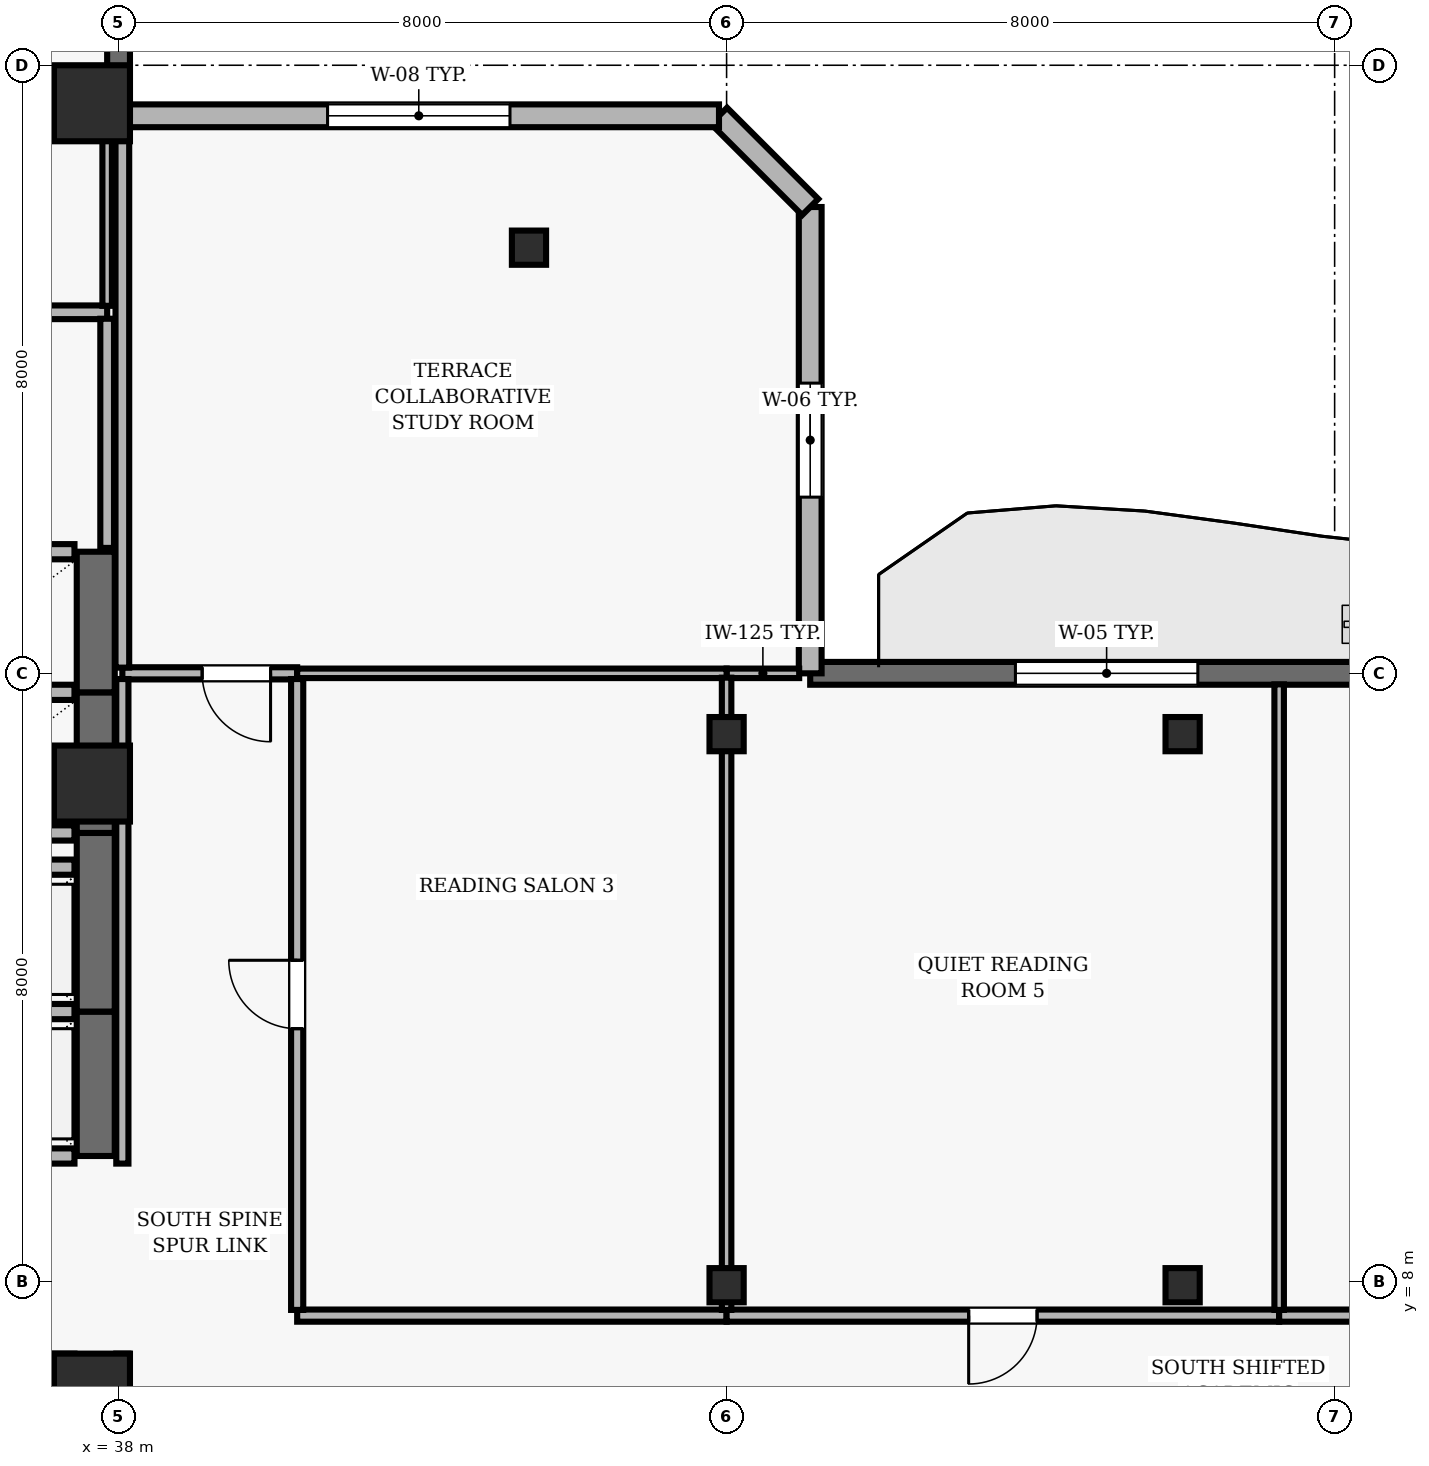
"""IFC4 building model, lengths in metres.
Left out: names, types, materials, properties, quantities, classifications, styles, units other than length and angle.
Written with IfcOpenShell. Run it as: python <this file> out.ifc"""

import sys

from ifc_helpers import new_model, si_unit, direction, frame, frame_2d, origin, origin_2d, place, context, subcontext, project, spatial, rectangle, hollow_rectangle, extrude, element, fill, save


model = new_model("IFC4")
c1 = context("Model", 3, precision=1e-05, world=origin(), true_north=direction((0.0, 1.0)))
c2 = subcontext(c1, "Body", "Model", "MODEL_VIEW")
j1 = project(units=[si_unit("LENGTHUNIT", "METRE"), si_unit("PLANEANGLEUNIT", "RADIAN")], contexts=[c1])
p1 = place(None, origin())
s1 = spatial("IfcSite", under=j1, at=p1, CompositionType="ELEMENT")
p2 = place(p1, origin())
s2 = spatial("IfcBuilding", under=s1, at=p2, CompositionType="ELEMENT")
p3 = place(p2, frame((0.0, 0.0, 199.2)))
s3 = spatial("IfcBuildingStorey", under=s2, at=p3, CompositionType="ELEMENT", Elevation=199.2)
for number, where, z_axis, x_axis in (
    (1, (37.65, 6.55, 0.0), (0.0, 0.0, 1.0), (1.0, 0.0, 0.0)),
    (2, (37.65, 14.55, 0.0), (0.0, 0.0, 1.0), (1.0, 0.0, 0.0)),
    (3, (37.65, 23.5, 0.0), (0.0, 0.0, 1.0), (1.0, 0.0, 0.0)),
):
    element("IfcColumn", number, at=place(p3, frame(where, z_axis=z_axis, x_axis=x_axis)), inside=s3, PredefinedType="COLUMN", context=c2, shape_type="SweptSolid", body=[
        extrude(rectangle(XDim=1.0, YDim=1.0, at=origin_2d()), origin(), (0.0, 0.0, 1.0), 3.9),
    ])
for number, where, z_axis, x_axis in (
    (4, (46.0, 7.95, 0.0), (0.0, 0.0, 1.0), (1.0, 0.0, 0.0)),
    (5, (46.0, 15.2, 0.0), (0.0, 0.0, 1.0), (1.0, 0.0, 0.0)),
    (6, (52.0, 7.95, 0.0), (0.0, 0.0, 1.0), (1.0, 0.0, 0.0)),
    (7, (52.0, 15.2, 0.0), (0.0, 0.0, 1.0), (1.0, 0.0, 0.0)),
    (8, (43.4, 21.6, 0.0), (0.0, 0.0, 1.0), (1.0, 0.0, 0.0)),
):
    element("IfcColumn", number, at=place(p3, frame(where, z_axis=z_axis, x_axis=x_axis)), inside=s3, PredefinedType="COLUMN", context=c2, shape_type="SweptSolid", body=[
        extrude(hollow_rectangle(XDim=0.45, YDim=0.45, WallThickness=0.02, at=origin_2d()), origin(), (0.0, 0.0, 1.0), 3.9),
    ])
p4 = place(p3, frame((62.7, 16.0, 0.0), z_axis=(0.0, 0.0, 1.0), x_axis=(-1.0, 0.0, 0.0)))
e9 = element("IfcWall", 9, at=p4, inside=s3, PredefinedType="SOLIDWALL", context=c2, shape_type="SweptSolid", body=[
    extrude(rectangle(XDim=15.6, YDim=0.3, at=frame_2d((7.8, 0.0))), origin(), (0.0, 0.0, 1.0), 3.69),
])
p5 = place(p4, frame((7.2, 0.0, 0.0)))
e10 = element("IfcOpeningElement", 10, at=p5, cuts=e9, PredefinedType="OPENING", context=c2, shape_type="SweptSolid", body=[
    extrude(rectangle(XDim=1.0, YDim=2.2, at=frame_2d((0.5, 1.1))), frame((0.0, 0.16, 0.0), z_axis=(0.0, -1.0, 0.0), x_axis=(1.0, 0.0, 0.0)), (0.0, 0.0, 1.0), 0.32),
])
p6 = place(p4, frame((10.5, 0.0, 0.9)))
e11 = element("IfcOpeningElement", 11, at=p6, cuts=e9, PredefinedType="OPENING", context=c2, shape_type="SweptSolid", body=[
    extrude(rectangle(XDim=2.4, YDim=1.6, at=frame_2d((1.2, 0.8))), frame((0.0, 0.16, 0.0), z_axis=(0.0, -1.0, 0.0), x_axis=(1.0, 0.0, 0.0)), (0.0, 0.0, 1.0), 0.32),
])
p7 = place(p3, frame((47.1, 16.0, 0.0), z_axis=(0.0, 0.0, 1.0), x_axis=(0.0, 1.0, 0.0)))
e12 = element("IfcWall", 12, at=p7, inside=s3, PredefinedType="SOLIDWALL", context=c2, shape_type="SweptSolid", body=[
    extrude(rectangle(XDim=6.135, YDim=0.3, at=frame_2d((3.067, 0.0))), origin(), (0.0, 0.0, 1.0), 3.69),
])
p8 = place(p7, frame((2.318, 0.0, 0.9)))
e13 = element("IfcOpeningElement", 13, at=p8, cuts=e12, PredefinedType="OPENING", context=c2, shape_type="SweptSolid", body=[
    extrude(rectangle(XDim=1.5, YDim=1.8, at=frame_2d((0.75, 0.9))), frame((0.0, 0.16, 0.0), z_axis=(0.0, -1.0, 0.0), x_axis=(1.0, 0.0, 0.0)), (0.0, 0.0, 1.0), 0.32),
])
p9 = place(p3, frame((47.1, 22.135, 0.0), z_axis=(0.0, 0.0, 1.0), x_axis=(-0.707178703759, 0.707034851297, 0.0)))
e14 = element("IfcWall", 14, at=p9, inside=s3, PredefinedType="SOLIDWALL", context=c2, shape_type="SweptSolid", body=[
    extrude(rectangle(XDim=1.697, YDim=0.3, at=frame_2d((0.849, 0.0))), origin(), (0.0, 0.0, 1.0), 3.69),
])
p10 = place(p3, frame((45.9, 23.335, 0.0), z_axis=(0.0, 0.0, 1.0), x_axis=(-1.0, 0.0, 0.0)))
e15 = element("IfcWall", 15, at=p10, inside=s3, PredefinedType="SOLIDWALL", context=c2, shape_type="SweptSolid", body=[
    extrude(rectangle(XDim=7.9, YDim=0.3, at=frame_2d((3.95, 0.0))), origin(), (0.0, 0.0, 1.0), 3.69),
])
p11 = place(p10, frame((2.75, 0.0, 0.9)))
e16 = element("IfcOpeningElement", 16, at=p11, cuts=e15, PredefinedType="OPENING", context=c2, shape_type="SweptSolid", body=[
    extrude(rectangle(XDim=2.4, YDim=1.8, at=frame_2d((1.2, 0.9))), frame((0.0, 0.16, 0.0), z_axis=(0.0, -1.0, 0.0), x_axis=(1.0, 0.0, 0.0)), (0.0, 0.0, 1.0), 0.32),
])
p12 = place(p3, frame((38.0, 23.335, 0.0), z_axis=(0.0, 0.0, 1.0), x_axis=(0.0, 1.0, 0.0)))
e17 = element("IfcWall", 17, at=p12, inside=s3, PredefinedType="SOLIDWALL", context=c2, shape_type="SweptSolid", body=[
    extrude(rectangle(XDim=17.365, YDim=0.3, at=frame_2d((8.683, 0.0))), origin(), (0.0, 0.0, 1.0), 3.69),
])
p13 = place(p12, frame((8.282, 0.0, 0.0)))
e18 = element("IfcOpeningElement", 18, at=p13, cuts=e17, PredefinedType="OPENING", context=c2, shape_type="SweptSolid", body=[
    extrude(rectangle(XDim=1.0, YDim=2.2, at=frame_2d((0.5, 1.1))), frame((0.0, 0.16, 0.0), z_axis=(0.0, -1.0, 0.0), x_axis=(1.0, 0.0, 0.0)), (0.0, 0.0, 1.0), 0.32),
])
p14 = place(p12, frame((13.071, 0.0, 0.9)))
e19 = element("IfcOpeningElement", 19, at=p14, cuts=e17, PredefinedType="OPENING", context=c2, shape_type="SweptSolid", body=[
    extrude(rectangle(XDim=2.8, YDim=1.8, at=frame_2d((1.4, 0.9))), frame((0.0, 0.16, 0.0), z_axis=(0.0, -1.0, 0.0), x_axis=(1.0, 0.0, 0.0)), (0.0, 0.0, 1.0), 0.32),
])
p15 = place(p3, frame((37.7, 4.7, 0.0), z_axis=(0.0, 0.0, 1.0), x_axis=(0.0, 1.0, 0.0)))
e20 = element("IfcWall", 20, at=p15, inside=s3, PredefinedType="SHEAR", context=c2, shape_type="SweptSolid", body=[
    extrude(rectangle(XDim=2.25, YDim=0.5, at=frame_2d((1.125, 0.0))), origin(), (0.0, 0.0, 1.0), 3.69),
])
p16 = place(p3, frame((37.42, 6.95, 0.0), z_axis=(0.0, 0.0, 1.0), x_axis=(-1.0, 0.0, 0.0)))
e21 = element("IfcWall", 21, at=p16, inside=s3, PredefinedType="SOLIDWALL", context=c2, shape_type="SweptSolid", body=[
    extrude(rectangle(XDim=2.14, YDim=0.2, at=frame_2d((1.07, 0.0))), origin(), (0.0, 0.0, 1.0), 3.69),
])
p17 = place(p3, frame((37.7, 9.65, 0.0), z_axis=(0.0, 0.0, 1.0), x_axis=(0.0, 1.0, 0.0)))
e22 = element("IfcWall", 22, at=p17, inside=s3, PredefinedType="SHEAR", context=c2, shape_type="SweptSolid", body=[
    extrude(rectangle(XDim=1.9, YDim=0.5, at=frame_2d((0.95, 0.0))), origin(), (0.0, 0.0, 1.0), 3.69),
])
for number, where, z_axis, x_axis in (
    (23, (35.28, 9.65, 0.0), (0.0, 0.0, 1.0), (1.0, 0.0, 0.0)),
    (24, (37.42, 11.55, 0.0), (0.0, 0.0, 1.0), (-1.0, 0.0, 0.0)),
):
    element("IfcWall", number, at=place(p3, frame(where, z_axis=z_axis, x_axis=x_axis)), inside=s3, PredefinedType="SOLIDWALL", context=c2, shape_type="SweptSolid", body=[
        extrude(rectangle(XDim=2.14, YDim=0.2, at=frame_2d((1.07, 0.0))), origin(), (0.0, 0.0, 1.0), 3.69),
    ])
p18 = place(p3, frame((37.7, 11.55, 0.0), z_axis=(0.0, 0.0, 1.0), x_axis=(0.0, 1.0, 0.0)))
e25 = element("IfcWall", 25, at=p18, inside=s3, PredefinedType="SHEAR", context=c2, shape_type="SweptSolid", body=[
    extrude(rectangle(XDim=2.35, YDim=0.5, at=frame_2d((1.175, 0.0))), origin(), (0.0, 0.0, 1.0), 3.69),
])
p19 = place(p3, frame((37.42, 13.45, 0.0), z_axis=(0.0, 0.0, 1.0), x_axis=(-1.0, 0.0, 0.0)))
e26 = element("IfcWall", 26, at=p19, inside=s3, PredefinedType="SOLIDWALL", context=c2, shape_type="SweptSolid", body=[
    extrude(rectangle(XDim=2.14, YDim=0.2, at=frame_2d((1.07, 0.0))), origin(), (0.0, 0.0, 1.0), 3.69),
])
p20 = place(p3, frame((37.7, 13.9, 0.0), z_axis=(0.0, 0.0, 1.0), x_axis=(0.0, 1.0, 0.0)))
e27 = element("IfcWall", 27, at=p20, inside=s3, PredefinedType="SHEAR", context=c2, shape_type="SweptSolid", body=[
    extrude(rectangle(XDim=1.85, YDim=0.5, at=frame_2d((0.925, 0.0))), origin(), (0.0, 0.0, 1.0), 3.69),
])
for number, where, z_axis, x_axis in (
    (28, (35.28, 13.9, 0.0), (0.0, 0.0, 1.0), (1.0, 0.0, 0.0)),
    (29, (37.42, 15.75, 0.0), (0.0, 0.0, 1.0), (-1.0, 0.0, 0.0)),
):
    element("IfcWall", number, at=place(p3, frame(where, z_axis=z_axis, x_axis=x_axis)), inside=s3, PredefinedType="SOLIDWALL", context=c2, shape_type="SweptSolid", body=[
        extrude(rectangle(XDim=2.14, YDim=0.2, at=frame_2d((1.07, 0.0))), origin(), (0.0, 0.0, 1.0), 3.69),
    ])
p21 = place(p3, frame((37.7, 15.75, 0.0), z_axis=(0.0, 0.0, 1.0), x_axis=(0.0, 1.0, 0.0)))
e30 = element("IfcWall", 30, at=p21, inside=s3, PredefinedType="SHEAR", context=c2, shape_type="SweptSolid", body=[
    extrude(rectangle(XDim=1.85, YDim=0.5, at=frame_2d((0.925, 0.0))), origin(), (0.0, 0.0, 1.0), 3.69),
])
p22 = place(p3, frame((37.42, 17.6, 0.0), z_axis=(0.0, 0.0, 1.0), x_axis=(-1.0, 0.0, 0.0)))
e31 = element("IfcWall", 31, at=p22, inside=s3, PredefinedType="SOLIDWALL", context=c2, shape_type="SweptSolid", body=[
    extrude(rectangle(XDim=2.14, YDim=0.2, at=frame_2d((1.07, 0.0))), origin(), (0.0, 0.0, 1.0), 3.69),
])
p23 = place(p3, frame((37.85, 20.75, 0.0), z_axis=(0.0, 0.0, 1.0), x_axis=(-1.0, 0.0, 0.0)))
e32 = element("IfcWall", 32, at=p23, inside=s3, PredefinedType="PARTITIONING", context=c2, shape_type="SweptSolid", body=[
    extrude(rectangle(XDim=4.0, YDim=0.18, at=frame_2d((2.0, 0.0))), origin(), (0.0, 0.0, 1.0), 3.69),
])
p24 = place(p3, frame((37.85, 23.85, 0.0), z_axis=(0.0, 0.0, 1.0), x_axis=(-1.0, 0.0, 0.0)))
e33 = element("IfcWall", 33, at=p24, inside=s3, PredefinedType="PARTITIONING", context=c2, shape_type="SweptSolid", body=[
    extrude(rectangle(XDim=4.0, YDim=0.16, at=frame_2d((2.0, 0.0))), origin(), (0.0, 0.0, 1.0), 3.139),
])
p25 = place(p24, frame((2.25, 0.0, 0.0)))
e34 = element("IfcOpeningElement", 34, at=p25, cuts=e33, PredefinedType="OPENING", context=c2, shape_type="SweptSolid", body=[
    extrude(rectangle(XDim=0.9, YDim=2.1, at=frame_2d((0.45, 1.05))), frame((0.0, 0.09, 0.0), z_axis=(0.0, -1.0, 0.0), x_axis=(1.0, 0.0, 0.0)), (0.0, 0.0, 1.0), 0.18),
])
p26 = place(p3, frame((40.35, 16.0, 0.0), z_axis=(0.0, 0.0, 1.0), x_axis=(-1.0, 0.0, 0.0)))
e35 = element("IfcWall", 35, at=p26, inside=s3, PredefinedType="PARTITIONING", context=c2, shape_type="SweptSolid", body=[
    extrude(rectangle(XDim=2.3, YDim=0.16, at=frame_2d((1.15, 0.0))), origin(), (0.0, 0.0, 1.0), 3.69),
])
p27 = place(p26, frame((0.35, 0.0, 0.0)))
e36 = element("IfcOpeningElement", 36, at=p27, cuts=e35, PredefinedType="OPENING", context=c2, shape_type="SweptSolid", body=[
    extrude(rectangle(XDim=0.9, YDim=2.1, at=frame_2d((0.45, 1.05))), frame((0.0, 0.09, 0.0), z_axis=(0.0, -1.0, 0.0), x_axis=(1.0, 0.0, 0.0)), (0.0, 0.0, 1.0), 0.18),
])
p28 = place(p3, frame((46.0, 7.55, 0.0), z_axis=(0.0, 0.0, 1.0), x_axis=(-1.0, 0.0, 0.0)))
e37 = element("IfcWall", 37, at=p28, inside=s3, PredefinedType="PARTITIONING", context=c2, shape_type="SweptSolid", body=[
    extrude(rectangle(XDim=5.65, YDim=0.16, at=frame_2d((2.825, 0.0))), origin(), (0.0, 0.0, 1.0), 3.139),
])
p29 = place(p3, frame((46.0, 16.0, 0.0), z_axis=(0.0, 0.0, 1.0), x_axis=(1.0, 0.0, 0.0)))
e38 = element("IfcWall", 38, at=p29, inside=s3, PredefinedType="PARTITIONING", context=c2, shape_type="SweptSolid", body=[
    extrude(rectangle(XDim=0.955, YDim=0.125, at=frame_2d((0.478, 0.0))), origin(), (0.0, 0.0, 1.0), 3.39),
])
p30 = place(p3, frame((46.0, 16.0, 0.0), z_axis=(0.0, 0.0, 1.0), x_axis=(-1.0, 0.0, 0.0)))
e39 = element("IfcWall", 39, at=p30, inside=s3, PredefinedType="PARTITIONING", context=c2, shape_type="SweptSolid", body=[
    extrude(rectangle(XDim=5.65, YDim=0.125, at=frame_2d((2.825, 0.0))), origin(), (0.0, 0.0, 1.0), 3.69),
])
p31 = place(p3, frame((53.27, 7.55, 0.0), z_axis=(0.0, 0.0, 1.0), x_axis=(-1.0, 0.0, 0.0)))
e40 = element("IfcWall", 40, at=p31, inside=s3, PredefinedType="PARTITIONING", context=c2, shape_type="SweptSolid", body=[
    extrude(rectangle(XDim=7.27, YDim=0.16, at=frame_2d((3.635, 0.0))), origin(), (0.0, 0.0, 1.0), 3.139),
])
p32 = place(p31, frame((3.185, 0.0, 0.0)))
e41 = element("IfcOpeningElement", 41, at=p32, cuts=e40, PredefinedType="OPENING", context=c2, shape_type="SweptSolid", body=[
    extrude(rectangle(XDim=0.9, YDim=2.1, at=frame_2d((0.45, 1.05))), frame((0.0, 0.09, 0.0), z_axis=(0.0, -1.0, 0.0), x_axis=(1.0, 0.0, 0.0)), (0.0, 0.0, 1.0), 0.18),
])
p33 = place(p3, frame((59.48, 7.55, 0.0), z_axis=(0.0, 0.0, 1.0), x_axis=(-1.0, 0.0, 0.0)))
e42 = element("IfcWall", 42, at=p33, inside=s3, PredefinedType="PARTITIONING", context=c2, shape_type="SweptSolid", body=[
    extrude(rectangle(XDim=6.21, YDim=0.16, at=frame_2d((3.105, 0.0))), origin(), (0.0, 0.0, 1.0), 3.139),
])
p34 = place(p33, frame((3.355, 0.0, 0.0)))
e43 = element("IfcOpeningElement", 43, at=p34, cuts=e42, PredefinedType="OPENING", context=c2, shape_type="SweptSolid", body=[
    extrude(rectangle(XDim=0.9, YDim=2.1, at=frame_2d((0.45, 1.05))), frame((0.0, 0.09, 0.0), z_axis=(0.0, -1.0, 0.0), x_axis=(1.0, 0.0, 0.0)), (0.0, 0.0, 1.0), 0.18),
])
p35 = place(p3, frame((37.85, 17.65, 0.0), z_axis=(0.0, 0.0, 1.0), x_axis=(0.0, 1.0, 0.0)))
e44 = element("IfcWall", 44, at=p35, inside=s3, PredefinedType="PARTITIONING", context=c2, shape_type="SweptSolid", body=[
    extrude(rectangle(XDim=3.015, YDim=0.18, at=frame_2d((1.508, 0.0))), origin(), (0.0, 0.0, 1.0), 3.139),
])
p36 = place(p3, frame((37.85, 20.835, 0.0), z_axis=(0.0, 0.0, 1.0), x_axis=(0.0, 1.0, 0.0)))
e45 = element("IfcWall", 45, at=p36, inside=s3, PredefinedType="PARTITIONING", context=c2, shape_type="SweptSolid", body=[
    extrude(rectangle(XDim=2.5, YDim=0.125, at=frame_2d((1.25, 0.0))), origin(), (0.0, 0.0, 1.0), 3.139),
])
p37 = place(p3, frame((38.05, 7.05, 0.0), z_axis=(0.0, 0.0, 1.0), x_axis=(0.0, -1.0, 0.0)))
e46 = element("IfcWall", 46, at=p37, inside=s3, PredefinedType="PARTITIONING", context=c2, shape_type="SweptSolid", body=[
    extrude(rectangle(XDim=1.515, YDim=0.16, at=frame_2d((0.758, 0.0))), origin(), (0.0, 0.0, 1.0), 3.139),
])
p38 = place(p3, frame((38.05, 15.925, 0.0), z_axis=(0.0, 0.0, 1.0), x_axis=(0.0, -1.0, 0.0)))
e47 = element("IfcWall", 47, at=p38, inside=s3, PredefinedType="PARTITIONING", context=c2, shape_type="SweptSolid", body=[
    extrude(rectangle(XDim=6.375, YDim=0.16, at=frame_2d((3.188, 0.0))), origin(), (0.0, 0.0, 1.0), 3.139),
])
p39 = place(p3, frame((38.05, 23.19, 0.0), z_axis=(0.0, 0.0, 1.0), x_axis=(0.0, -1.0, 0.0)))
e48 = element("IfcWall", 48, at=p39, inside=s3, PredefinedType="PARTITIONING", context=c2, shape_type="SweptSolid", body=[
    extrude(rectangle(XDim=7.115, YDim=0.18, at=frame_2d((3.558, 0.0))), origin(), (0.0, 0.0, 1.0), 3.139),
])
p40 = place(p3, frame((40.35, 7.625, 0.0), z_axis=(0.0, 0.0, 1.0), x_axis=(0.0, 1.0, 0.0)))
e49 = element("IfcWall", 49, at=p40, inside=s3, PredefinedType="PARTITIONING", context=c2, shape_type="SweptSolid", body=[
    extrude(rectangle(XDim=8.3, YDim=0.16, at=frame_2d((4.15, 0.0))), origin(), (0.0, 0.0, 1.0), 3.343),
])
p41 = place(p40, frame((3.7, 0.0, 0.0)))
e50 = element("IfcOpeningElement", 50, at=p41, cuts=e49, PredefinedType="OPENING", context=c2, shape_type="SweptSolid", body=[
    extrude(rectangle(XDim=0.9, YDim=2.1, at=frame_2d((0.45, 1.05))), frame((0.0, 0.09, 0.0), z_axis=(0.0, -1.0, 0.0), x_axis=(1.0, 0.0, 0.0)), (0.0, 0.0, 1.0), 0.18),
])
p42 = place(p3, frame((46.0, 7.625, 0.0), z_axis=(0.0, 0.0, 1.0), x_axis=(0.0, 1.0, 0.0)))
e51 = element("IfcWall", 51, at=p42, inside=s3, PredefinedType="PARTITIONING", context=c2, shape_type="SweptSolid", body=[
    extrude(rectangle(XDim=8.318, YDim=0.125, at=frame_2d((4.159, 0.0))), origin(), (0.0, 0.0, 1.0), 3.139),
])
p43 = place(p3, frame((53.27, 7.625, 0.0), z_axis=(0.0, 0.0, 1.0), x_axis=(0.0, 1.0, 0.0)))
e52 = element("IfcWall", 52, at=p43, inside=s3, PredefinedType="PARTITIONING", context=c2, shape_type="SweptSolid", body=[
    extrude(rectangle(XDim=8.23, YDim=0.125, at=frame_2d((4.115, 0.0))), origin(), (0.0, 0.0, 1.0), 3.69),
])
p44 = place(p6, origin())
e53 = element("IfcWindow", 53, at=p44, inside=s3, PartitioningType="SINGLE_PANEL", PredefinedType="WINDOW", context=c2, shape_type="SweptSolid", body=[
    extrude(rectangle(XDim=2.4, YDim=1.6, at=frame_2d((1.2, 0.8))), frame((0.0, 0.03, 0.0), z_axis=(0.0, -1.0, 0.0), x_axis=(1.0, 0.0, 0.0)), (0.0, 0.0, 1.0), 0.06),
])
fill(e11, e53)
p45 = place(p8, origin())
e54 = element("IfcWindow", 54, at=p45, inside=s3, PartitioningType="SINGLE_PANEL", PredefinedType="WINDOW", context=c2, shape_type="SweptSolid", body=[
    extrude(rectangle(XDim=1.5, YDim=1.8, at=frame_2d((0.75, 0.9))), frame((0.0, 0.03, 0.0), z_axis=(0.0, -1.0, 0.0), x_axis=(1.0, 0.0, 0.0)), (0.0, 0.0, 1.0), 0.06),
])
fill(e13, e54)
p46 = place(p11, origin())
e55 = element("IfcWindow", 55, at=p46, inside=s3, PartitioningType="SINGLE_PANEL", PredefinedType="WINDOW", context=c2, shape_type="SweptSolid", body=[
    extrude(rectangle(XDim=2.4, YDim=1.8, at=frame_2d((1.2, 0.9))), frame((0.0, 0.03, 0.0), z_axis=(0.0, -1.0, 0.0), x_axis=(1.0, 0.0, 0.0)), (0.0, 0.0, 1.0), 0.06),
])
fill(e16, e55)
p47 = place(p41, origin())
e56 = element("IfcDoor", 56, at=p47, inside=s3, OperationType="SINGLE_SWING_RIGHT", PredefinedType="DOOR", context=c2, shape_type="SweptSolid", body=[
    extrude(rectangle(XDim=0.9, YDim=2.1, at=frame_2d((0.45, 1.05))), frame((0.0, 0.025, 0.0), z_axis=(0.0, -1.0, 0.0), x_axis=(1.0, 0.0, 0.0)), (0.0, 0.0, 1.0), 0.05),
])
fill(e50, e56)
p48 = place(p32, origin())
e57 = element("IfcDoor", 57, at=p48, inside=s3, OperationType="SINGLE_SWING_RIGHT", PredefinedType="DOOR", context=c2, shape_type="SweptSolid", body=[
    extrude(rectangle(XDim=0.9, YDim=2.1, at=frame_2d((0.45, 1.05))), frame((0.0, 0.025, 0.0), z_axis=(0.0, -1.0, 0.0), x_axis=(1.0, 0.0, 0.0)), (0.0, 0.0, 1.0), 0.05),
])
fill(e41, e57)
p49 = place(p27, origin())
e58 = element("IfcDoor", 58, at=p49, inside=s3, OperationType="SINGLE_SWING_LEFT", PredefinedType="DOOR", context=c2, shape_type="SweptSolid", body=[
    extrude(rectangle(XDim=0.9, YDim=2.1, at=frame_2d((0.45, 1.05))), frame((0.0, 0.025, 0.0), z_axis=(0.0, -1.0, 0.0), x_axis=(1.0, 0.0, 0.0)), (0.0, 0.0, 1.0), 0.05),
])
fill(e36, e58)
save(model, sys.argv[1])
